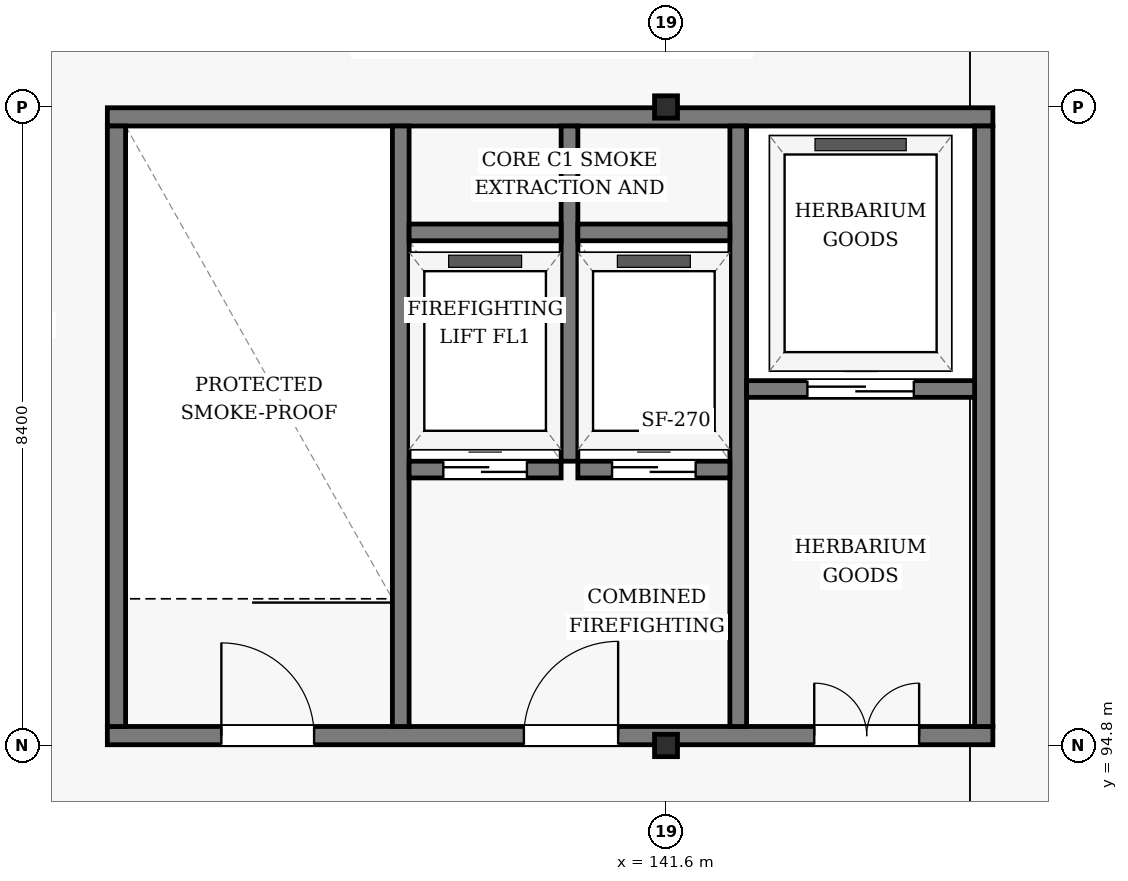
"""IFC4 building model, lengths in metres.
Left out: names, types, materials, properties, quantities, classifications, styles, units other than length and angle.
Written with IfcOpenShell. Run it as: python <this file> out.ifc"""

import sys

from ifc_helpers import new_model, si_unit, direction, frame, frame_2d, origin, origin_2d, place, context, subcontext, project, spatial, rectangle, i_section, extrude, element, fill, save


model = new_model("IFC4")
c1 = context("Model", 3, precision=1e-05, world=origin(), true_north=direction((0.0, 1.0)))
c2 = subcontext(c1, "Body", "Model", "MODEL_VIEW")
j1 = project(units=[si_unit("LENGTHUNIT", "METRE"), si_unit("PLANEANGLEUNIT", "RADIAN")], contexts=[c1])
p1 = place(None, origin())
s1 = spatial("IfcSite", under=j1, at=p1, CompositionType="ELEMENT")
p2 = place(p1, origin())
s2 = spatial("IfcBuilding", under=s1, at=p2, CompositionType="ELEMENT")
p3 = place(p2, frame((0.0, 0.0, 61.2)))
s3 = spatial("IfcBuildingStorey", under=s2, at=p3, CompositionType="ELEMENT", Elevation=61.2)
for number, where, z_axis, x_axis in (
    (1, (141.6, 94.8, 0.0), (0.0, 0.0, 1.0), (1.0, 0.0, 0.0)),
    (2, (141.6, 103.2, 0.0), (0.0, 0.0, 1.0), (1.0, 0.0, 0.0)),
):
    element("IfcColumn", number, at=place(p3, frame(where, z_axis=z_axis, x_axis=x_axis)), inside=s3, PredefinedType="COLUMN", context=c2, shape_type="SweptSolid", body=[
        extrude(i_section(OverallWidth=0.302, OverallDepth=0.294, WebThickness=0.012, FlangeThickness=0.012, FilletRadius=0.018, at=origin_2d()), origin(), (0.0, 0.0, 1.0), 4.2),
    ])
p4 = place(p3, frame((134.25, 94.93, 0.0), z_axis=(0.0, 0.0, 1.0), x_axis=(1.0, 0.0, 0.0)))
e3 = element("IfcWall", 3, at=p4, inside=s3, PredefinedType="SHEAR", context=c2, shape_type="SweptSolid", body=[
    extrude(rectangle(XDim=11.65, YDim=0.24, at=frame_2d((5.825, 0.0))), origin(), (0.0, 0.0, 1.0), 3.96),
])
p5 = place(p4, frame((1.5, 0.0, 0.0)))
e4 = element("IfcOpeningElement", 4, at=p5, cuts=e3, PredefinedType="OPENING", context=c2, shape_type="SweptSolid", body=[
    extrude(rectangle(XDim=1.22, YDim=2.18, at=frame_2d((0.61, 1.09))), frame((0.0, 0.13, 0.0), z_axis=(0.0, -1.0, 0.0), x_axis=(1.0, 0.0, 0.0)), (0.0, 0.0, 1.0), 0.26),
])
p6 = place(p4, frame((5.48, 0.0, 0.0)))
e5 = element("IfcOpeningElement", 5, at=p6, cuts=e3, PredefinedType="OPENING", context=c2, shape_type="SweptSolid", body=[
    extrude(rectangle(XDim=1.24, YDim=2.15, at=frame_2d((0.62, 1.075))), frame((0.0, 0.13, 0.0), z_axis=(0.0, -1.0, 0.0), x_axis=(1.0, 0.0, 0.0)), (0.0, 0.0, 1.0), 0.26),
])
p7 = place(p4, frame((9.3, 0.0, 0.0)))
e6 = element("IfcOpeningElement", 6, at=p7, cuts=e3, PredefinedType="OPENING", context=c2, shape_type="SweptSolid", body=[
    extrude(rectangle(XDim=1.38, YDim=2.15, at=frame_2d((0.69, 1.075))), frame((0.0, 0.13, 0.0), z_axis=(0.0, -1.0, 0.0), x_axis=(1.0, 0.0, 0.0)), (0.0, 0.0, 1.0), 0.26),
])
p8 = place(p3, frame((134.25, 103.07, 0.0), z_axis=(0.0, 0.0, 1.0), x_axis=(1.0, 0.0, 0.0)))
e7 = element("IfcWall", 7, at=p8, inside=s3, PredefinedType="SHEAR", context=c2, shape_type="SweptSolid", body=[
    extrude(rectangle(XDim=11.65, YDim=0.24, at=frame_2d((5.825, 0.0))), origin(), (0.0, 0.0, 1.0), 3.96),
])
p9 = place(p3, frame((134.37, 95.05, 0.0), z_axis=(0.0, 0.0, 1.0), x_axis=(0.0, 1.0, 0.0)))
e8 = element("IfcWall", 8, at=p9, inside=s3, PredefinedType="SHEAR", context=c2, shape_type="SweptSolid", body=[
    extrude(rectangle(XDim=7.9, YDim=0.24, at=frame_2d((3.95, 0.0))), origin(), (0.0, 0.0, 1.0), 3.96),
])
p10 = place(p3, frame((138.11, 95.05, 0.0), z_axis=(0.0, 0.0, 1.0), x_axis=(0.0, 1.0, 0.0)))
e9 = element("IfcWall", 9, at=p10, inside=s3, PredefinedType="SHEAR", context=c2, shape_type="SweptSolid", body=[
    extrude(rectangle(XDim=7.9, YDim=0.22, at=frame_2d((3.95, 0.0))), origin(), (0.0, 0.0, 1.0), 3.96),
])
p11 = place(p3, frame((140.33, 98.54, 0.0), z_axis=(0.0, 0.0, 1.0), x_axis=(0.0, 1.0, 0.0)))
e10 = element("IfcWall", 10, at=p11, inside=s3, PredefinedType="SHEAR", context=c2, shape_type="SweptSolid", body=[
    extrude(rectangle(XDim=4.41, YDim=0.22, at=frame_2d((2.205, 0.0))), origin(), (0.0, 0.0, 1.0), 3.96),
])
p12 = place(p3, frame((142.55, 95.05, 0.0), z_axis=(0.0, 0.0, 1.0), x_axis=(0.0, 1.0, 0.0)))
e11 = element("IfcWall", 11, at=p12, inside=s3, PredefinedType="SHEAR", context=c2, shape_type="SweptSolid", body=[
    extrude(rectangle(XDim=7.9, YDim=0.22, at=frame_2d((3.95, 0.0))), origin(), (0.0, 0.0, 1.0), 3.96),
])
p13 = place(p3, frame((145.78, 95.05, 0.0), z_axis=(0.0, 0.0, 1.0), x_axis=(0.0, 1.0, 0.0)))
e12 = element("IfcWall", 12, at=p13, inside=s3, PredefinedType="SHEAR", context=c2, shape_type="SweptSolid", body=[
    extrude(rectangle(XDim=7.9, YDim=0.24, at=frame_2d((3.95, 0.0))), origin(), (0.0, 0.0, 1.0), 3.96),
])
p14 = place(p3, frame((138.22, 98.43, 0.0), z_axis=(0.0, 0.0, 1.0), x_axis=(1.0, 0.0, 0.0)))
e13 = element("IfcWall", 13, at=p14, inside=s3, PredefinedType="SHEAR", context=c2, shape_type="SweptSolid", body=[
    extrude(rectangle(XDim=2.0, YDim=0.22, at=frame_2d((1.0, 0.0))), origin(), (0.0, 0.0, 1.0), 3.96),
])
p15 = place(p14, frame((0.45, 0.0, 0.0)))
e14 = element("IfcOpeningElement", 14, at=p15, cuts=e13, PredefinedType="OPENING", context=c2, shape_type="SweptSolid", body=[
    extrude(rectangle(XDim=1.1, YDim=2.15, at=frame_2d((0.55, 1.075))), frame((0.0, 0.12, 0.0), z_axis=(0.0, -1.0, 0.0), x_axis=(1.0, 0.0, 0.0)), (0.0, 0.0, 1.0), 0.24),
])
p16 = place(p3, frame((140.44, 98.43, 0.0), z_axis=(0.0, 0.0, 1.0), x_axis=(1.0, 0.0, 0.0)))
e15 = element("IfcWall", 15, at=p16, inside=s3, PredefinedType="SHEAR", context=c2, shape_type="SweptSolid", body=[
    extrude(rectangle(XDim=2.0, YDim=0.22, at=frame_2d((1.0, 0.0))), origin(), (0.0, 0.0, 1.0), 3.96),
])
p17 = place(p16, frame((0.45, 0.0, 0.0)))
e16 = element("IfcOpeningElement", 16, at=p17, cuts=e15, PredefinedType="OPENING", context=c2, shape_type="SweptSolid", body=[
    extrude(rectangle(XDim=1.1, YDim=2.15, at=frame_2d((0.55, 1.075))), frame((0.0, 0.12, 0.0), z_axis=(0.0, -1.0, 0.0), x_axis=(1.0, 0.0, 0.0)), (0.0, 0.0, 1.0), 0.24),
])
for number, where, z_axis, x_axis in (
    (17, (138.22, 101.55, 0.0), (0.0, 0.0, 1.0), (1.0, 0.0, 0.0)),
    (18, (140.44, 101.55, 0.0), (0.0, 0.0, 1.0), (1.0, 0.0, 0.0)),
):
    element("IfcWall", number, at=place(p3, frame(where, z_axis=z_axis, x_axis=x_axis)), inside=s3, PredefinedType="SHEAR", context=c2, shape_type="SweptSolid", body=[
        extrude(rectangle(XDim=2.0, YDim=0.22, at=frame_2d((1.0, 0.0))), origin(), (0.0, 0.0, 1.0), 3.96),
    ])
p18 = place(p3, frame((142.66, 99.49, 0.0), z_axis=(0.0, 0.0, 1.0), x_axis=(1.0, 0.0, 0.0)))
e19 = element("IfcWall", 19, at=p18, inside=s3, PredefinedType="SHEAR", context=c2, shape_type="SweptSolid", body=[
    extrude(rectangle(XDim=3.0, YDim=0.22, at=frame_2d((1.5, 0.0))), origin(), (0.0, 0.0, 1.0), 3.96),
])
p19 = place(p18, frame((0.8, 0.0, 0.0)))
e20 = element("IfcOpeningElement", 20, at=p19, cuts=e19, PredefinedType="OPENING", context=c2, shape_type="SweptSolid", body=[
    extrude(rectangle(XDim=1.4, YDim=2.2, at=frame_2d((0.7, 1.1))), frame((0.0, 0.12, 0.0), z_axis=(0.0, -1.0, 0.0), x_axis=(1.0, 0.0, 0.0)), (0.0, 0.0, 1.0), 0.24),
])
p20 = place(p5, origin())
e21 = element("IfcDoor", 21, at=p20, inside=s3, OperationType="SINGLE_SWING_LEFT", PredefinedType="DOOR", context=c2, shape_type="SweptSolid", body=[
    extrude(rectangle(XDim=1.22, YDim=2.18, at=frame_2d((0.61, 1.09))), frame((0.0, 0.025, 0.0), z_axis=(0.0, -1.0, 0.0), x_axis=(1.0, 0.0, 0.0)), (0.0, 0.0, 1.0), 0.05),
])
fill(e4, e21)
p21 = place(p6, frame((1.24, 0.0, 0.0), z_axis=(0.0, 0.0, 1.0), x_axis=(-1.0, 0.0, 0.0)))
e22 = element("IfcDoor", 22, at=p21, inside=s3, OperationType="SINGLE_SWING_RIGHT", PredefinedType="DOOR", context=c2, shape_type="SweptSolid", body=[
    extrude(rectangle(XDim=1.24, YDim=2.15, at=frame_2d((0.62, 1.075))), frame((0.0, 0.025, 0.0), z_axis=(0.0, -1.0, 0.0), x_axis=(1.0, 0.0, 0.0)), (0.0, 0.0, 1.0), 0.05),
])
fill(e5, e22)
p22 = place(p7, frame((1.38, 0.0, 0.0), z_axis=(0.0, 0.0, 1.0), x_axis=(-1.0, 0.0, 0.0)))
e23 = element("IfcDoor", 23, at=p22, inside=s3, OperationType="DOUBLE_DOOR_SINGLE_SWING", PredefinedType="DOOR", context=c2, shape_type="SweptSolid", body=[
    extrude(rectangle(XDim=1.38, YDim=2.15, at=frame_2d((0.69, 1.075))), frame((0.0, 0.025, 0.0), z_axis=(0.0, -1.0, 0.0), x_axis=(1.0, 0.0, 0.0)), (0.0, 0.0, 1.0), 0.05),
])
fill(e6, e23)
p23 = place(p15, origin())
e24 = element("IfcDoor", 24, at=p23, inside=s3, OperationType="SLIDING_TO_LEFT", PredefinedType="DOOR", context=c2, shape_type="SweptSolid", body=[
    extrude(rectangle(XDim=1.1, YDim=2.15, at=frame_2d((0.55, 1.075))), frame((0.0, 0.025, 0.0), z_axis=(0.0, -1.0, 0.0), x_axis=(1.0, 0.0, 0.0)), (0.0, 0.0, 1.0), 0.05),
])
fill(e14, e24)
p24 = place(p17, origin())
e25 = element("IfcDoor", 25, at=p24, inside=s3, OperationType="SLIDING_TO_LEFT", PredefinedType="DOOR", context=c2, shape_type="SweptSolid", body=[
    extrude(rectangle(XDim=1.1, YDim=2.15, at=frame_2d((0.55, 1.075))), frame((0.0, 0.025, 0.0), z_axis=(0.0, -1.0, 0.0), x_axis=(1.0, 0.0, 0.0)), (0.0, 0.0, 1.0), 0.05),
])
fill(e16, e25)
p25 = place(p19, origin())
e26 = element("IfcDoor", 26, at=p25, inside=s3, OperationType="SLIDING_TO_LEFT", PredefinedType="DOOR", context=c2, shape_type="SweptSolid", body=[
    extrude(rectangle(XDim=1.4, YDim=2.2, at=frame_2d((0.7, 1.1))), frame((0.0, 0.025, 0.0), z_axis=(0.0, -1.0, 0.0), x_axis=(1.0, 0.0, 0.0)), (0.0, 0.0, 1.0), 0.05),
])
fill(e20, e26)
save(model, sys.argv[1])
